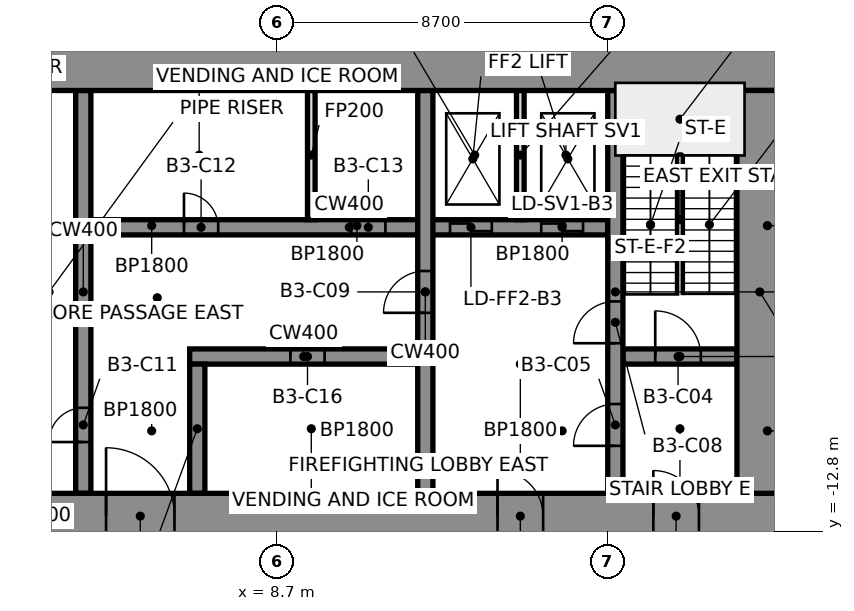
"""IFC4 building model, lengths in metres.
Left out: names, types, materials, properties, quantities, classifications, styles, units other than length and angle.
Written with IfcOpenShell. Run it as: python <this file> out.ifc"""

import sys

from ifc_helpers import new_model, si_unit, direction, frame, frame_2d, origin, place, context, subcontext, project, spatial, rectangle, extrude, element, fill, save


model = new_model("IFC4")
c1 = context("Model", 3, precision=1e-05, world=origin(), true_north=direction((0.0, 1.0)))
c2 = subcontext(c1, "Body", "Model", "MODEL_VIEW")
j1 = project(units=[si_unit("LENGTHUNIT", "METRE"), si_unit("PLANEANGLEUNIT", "RADIAN")], contexts=[c1])
p1 = place(None, origin())
s1 = spatial("IfcSite", under=j1, at=p1, CompositionType="ELEMENT")
p2 = place(p1, origin())
s2 = spatial("IfcBuilding", under=s1, at=p2, CompositionType="ELEMENT")
p3 = place(p2, frame((0.0, 0.0, -15.0)))
s3 = spatial("IfcBuildingStorey", under=s2, at=p3, CompositionType="ELEMENT", Elevation=-15.0)
p4 = place(p3, frame((6.4, -8.2, 0.0), z_axis=(0.0, 0.0, 1.0), x_axis=(1.0, 0.0, 0.0)))
e1 = element("IfcWall", 1, at=p4, inside=s3, PredefinedType="SHEAR", context=c2, shape_type="SweptSolid", body=[
    extrude(rectangle(XDim=6.0, YDim=0.4, at=frame_2d((3.0, 0.0))), origin(), (0.0, 0.0, 1.0), 5.0),
])
p5 = place(p4, frame((2.65, 0.0, 0.0)))
e2 = element("IfcOpeningElement", 2, at=p5, cuts=e1, PredefinedType="OPENING", context=c2, shape_type="SweptSolid", body=[
    extrude(rectangle(XDim=0.9, YDim=2.1, at=frame_2d((0.45, 1.05))), frame((0.0, 0.212, 0.0), z_axis=(0.0, -1.0, 0.0), x_axis=(1.0, 0.0, 0.0)), (0.0, 0.0, 1.0), 0.424),
])
p6 = place(p3, frame((17.8, -8.2, 0.0), z_axis=(0.0, 0.0, 1.0), x_axis=(1.0, 0.0, 0.0)))
e3 = element("IfcWall", 3, at=p6, inside=s3, PredefinedType="SHEAR", context=c2, shape_type="SweptSolid", body=[
    extrude(rectangle(XDim=3.0, YDim=0.4, at=frame_2d((1.5, 0.0))), origin(), (0.0, 0.0, 1.0), 5.0),
])
p7 = place(p6, frame((0.85, 0.0, 0.0)))
e4 = element("IfcOpeningElement", 4, at=p7, cuts=e3, PredefinedType="OPENING", context=c2, shape_type="SweptSolid", body=[
    extrude(rectangle(XDim=1.2, YDim=2.1, at=frame_2d((0.6, 1.05))), frame((0.0, 0.212, 0.0), z_axis=(0.0, -1.0, 0.0), x_axis=(1.0, 0.0, 0.0)), (0.0, 0.0, 1.0), 0.424),
])
p8 = place(p3, frame((3.8, -4.8, 0.0), z_axis=(0.0, 0.0, 1.0), x_axis=(1.0, 0.0, 0.0)))
e5 = element("IfcWall", 5, at=p8, inside=s3, PredefinedType="SHEAR", context=c2, shape_type="SweptSolid", body=[
    extrude(rectangle(XDim=13.6, YDim=0.4, at=frame_2d((6.8, 0.0))), origin(), (0.0, 0.0, 1.0), 5.0),
])
p9 = place(p8, frame((9.45, 0.0, 0.0)))
e6 = element("IfcOpeningElement", 6, at=p9, cuts=e5, PredefinedType="OPENING", context=c2, shape_type="SweptSolid", body=[
    extrude(rectangle(XDim=1.1, YDim=2.1, at=frame_2d((0.55, 1.05))), frame((0.0, 0.212, 0.0), z_axis=(0.0, -1.0, 0.0), x_axis=(1.0, 0.0, 0.0)), (0.0, 0.0, 1.0), 0.424),
])
p10 = place(p8, frame((11.85, 0.0, 0.0)))
e7 = element("IfcOpeningElement", 7, at=p10, cuts=e5, PredefinedType="OPENING", context=c2, shape_type="SweptSolid", body=[
    extrude(rectangle(XDim=1.1, YDim=2.1, at=frame_2d((0.55, 1.05))), frame((0.0, 0.212, 0.0), z_axis=(0.0, -1.0, 0.0), x_axis=(1.0, 0.0, 0.0)), (0.0, 0.0, 1.0), 0.424),
])
p11 = place(p8, frame((2.45, 0.0, 0.0)))
e8 = element("IfcOpeningElement", 8, at=p11, cuts=e5, PredefinedType="OPENING", context=c2, shape_type="SweptSolid", body=[
    extrude(rectangle(XDim=0.9, YDim=2.1, at=frame_2d((0.45, 1.05))), frame((0.0, 0.212, 0.0), z_axis=(0.0, -1.0, 0.0), x_axis=(1.0, 0.0, 0.0)), (0.0, 0.0, 1.0), 0.424),
])
p12 = place(p8, frame((6.85, 0.0, 0.0)))
e9 = element("IfcOpeningElement", 9, at=p12, cuts=e5, PredefinedType="OPENING", context=c2, shape_type="SweptSolid", body=[
    extrude(rectangle(XDim=0.9, YDim=2.1, at=frame_2d((0.45, 1.05))), frame((0.0, 0.212, 0.0), z_axis=(0.0, -1.0, 0.0), x_axis=(1.0, 0.0, 0.0)), (0.0, 0.0, 1.0), 0.424),
])
p13 = place(p3, frame((3.6, -11.8, 0.0), z_axis=(0.0, 0.0, 1.0), x_axis=(0.0, 1.0, 0.0)))
e10 = element("IfcWall", 10, at=p13, inside=s3, PredefinedType="SHEAR", context=c2, shape_type="SweptSolid", body=[
    extrude(rectangle(XDim=10.6, YDim=0.4, at=frame_2d((5.3, 0.0))), origin(), (0.0, 0.0, 1.0), 5.0),
])
p14 = place(p13, frame((1.35, 0.0, 0.0)))
e11 = element("IfcOpeningElement", 11, at=p14, cuts=e10, PredefinedType="OPENING", context=c2, shape_type="SweptSolid", body=[
    extrude(rectangle(XDim=0.9, YDim=2.1, at=frame_2d((0.45, 1.05))), frame((0.0, 0.212, 0.0), z_axis=(0.0, -1.0, 0.0), x_axis=(1.0, 0.0, 0.0)), (0.0, 0.0, 1.0), 0.424),
])
p15 = place(p3, frame((6.6, -11.8, 0.0), z_axis=(0.0, 0.0, 1.0), x_axis=(0.0, 1.0, 0.0)))
e12 = element("IfcWall", 12, at=p15, inside=s3, PredefinedType="SHEAR", context=c2, shape_type="SweptSolid", body=[
    extrude(rectangle(XDim=3.4, YDim=0.4, at=frame_2d((1.7, 0.0))), origin(), (0.0, 0.0, 1.0), 5.0),
])
p16 = place(p3, frame((9.6, -4.6, 0.0), z_axis=(0.0, 0.0, 1.0), x_axis=(0.0, 1.0, 0.0)))
e13 = element("IfcWall", 13, at=p16, inside=s3, PredefinedType="PARTITIONING", context=c2, shape_type="SweptSolid", body=[
    extrude(rectangle(XDim=3.4, YDim=0.2, at=frame_2d((1.7, 0.0))), origin(), (0.0, 0.0, 1.0), 4.7),
])
p17 = place(p3, frame((12.6, -11.8, 0.0), z_axis=(0.0, 0.0, 1.0), x_axis=(0.0, 1.0, 0.0)))
e14 = element("IfcWall", 14, at=p17, inside=s3, PredefinedType="SHEAR", context=c2, shape_type="SweptSolid", body=[
    extrude(rectangle(XDim=10.6, YDim=0.4, at=frame_2d((5.3, 0.0))), origin(), (0.0, 0.0, 1.0), 5.0),
])
p18 = place(p17, frame((4.75, 0.0, 0.0)))
e15 = element("IfcOpeningElement", 15, at=p18, cuts=e14, PredefinedType="OPENING", context=c2, shape_type="SweptSolid", body=[
    extrude(rectangle(XDim=1.1, YDim=2.1, at=frame_2d((0.55, 1.05))), frame((0.0, 0.212, 0.0), z_axis=(0.0, -1.0, 0.0), x_axis=(1.0, 0.0, 0.0)), (0.0, 0.0, 1.0), 0.424),
])
p19 = place(p3, frame((15.1, -4.6, 0.0), z_axis=(0.0, 0.0, 1.0), x_axis=(0.0, 1.0, 0.0)))
e16 = element("IfcWall", 16, at=p19, inside=s3, PredefinedType="PARTITIONING", context=c2, shape_type="SweptSolid", body=[
    extrude(rectangle(XDim=3.4, YDim=0.2, at=frame_2d((1.7, 0.0))), origin(), (0.0, 0.0, 1.0), 4.7),
])
p20 = place(p3, frame((17.6, -11.8, 0.0), z_axis=(0.0, 0.0, 1.0), x_axis=(0.0, 1.0, 0.0)))
e17 = element("IfcWall", 17, at=p20, inside=s3, PredefinedType="SHEAR", context=c2, shape_type="SweptSolid", body=[
    extrude(rectangle(XDim=10.6, YDim=0.4, at=frame_2d((5.3, 0.0))), origin(), (0.0, 0.0, 1.0), 5.0),
])
p21 = place(p20, frame((1.25, 0.0, 0.0)))
e18 = element("IfcOpeningElement", 18, at=p21, cuts=e17, PredefinedType="OPENING", context=c2, shape_type="SweptSolid", body=[
    extrude(rectangle(XDim=1.1, YDim=2.1, at=frame_2d((0.55, 1.05))), frame((0.0, 0.212, 0.0), z_axis=(0.0, -1.0, 0.0), x_axis=(1.0, 0.0, 0.0)), (0.0, 0.0, 1.0), 0.424),
])
p22 = place(p20, frame((3.95, 0.0, 0.0)))
e19 = element("IfcOpeningElement", 19, at=p22, cuts=e17, PredefinedType="OPENING", context=c2, shape_type="SweptSolid", body=[
    extrude(rectangle(XDim=1.1, YDim=2.1, at=frame_2d((0.55, 1.05))), frame((0.0, 0.212, 0.0), z_axis=(0.0, -1.0, 0.0), x_axis=(1.0, 0.0, 0.0)), (0.0, 0.0, 1.0), 0.424),
])
p23 = place(p3, frame((-22.0, -0.6, 0.0), z_axis=(0.0, 0.0, 1.0), x_axis=(1.0, 0.0, 0.0)))
e20 = element("IfcWall", 20, at=p23, inside=s3, PredefinedType="SHEAR", context=c2, shape_type="SweptSolid", body=[
    extrude(rectangle(XDim=44.0, YDim=1.2, at=frame_2d((22.0, 0.0))), origin(), (0.0, 0.0, 1.0), 5.0),
])
p24 = place(p3, frame((-22.0, -12.4, 0.0), z_axis=(0.0, 0.0, 1.0), x_axis=(1.0, 0.0, 0.0)))
e21 = element("IfcWall", 21, at=p24, inside=s3, PredefinedType="SHEAR", context=c2, shape_type="SweptSolid", body=[
    extrude(rectangle(XDim=44.0, YDim=1.2, at=frame_2d((22.0, 0.0))), origin(), (0.0, 0.0, 1.0), 5.0),
])
p25 = place(p24, frame((2.2, 0.0, 0.0)))
e22 = element("IfcOpeningElement", 22, at=p25, cuts=e21, PredefinedType="OPENING", context=c2, shape_type="SweptSolid", body=[
    extrude(rectangle(XDim=1.2, YDim=2.1, at=frame_2d((0.6, 1.05))), frame((0.0, 0.612, 0.0), z_axis=(0.0, -1.0, 0.0), x_axis=(1.0, 0.0, 0.0)), (0.0, 0.0, 1.0), 1.224),
])
p26 = place(p24, frame((21.4, 0.0, 0.0)))
e23 = element("IfcOpeningElement", 23, at=p26, cuts=e21, PredefinedType="OPENING", context=c2, shape_type="SweptSolid", body=[
    extrude(rectangle(XDim=1.2, YDim=2.1, at=frame_2d((0.6, 1.05))), frame((0.0, 0.612, 0.0), z_axis=(0.0, -1.0, 0.0), x_axis=(1.0, 0.0, 0.0)), (0.0, 0.0, 1.0), 1.224),
])
p27 = place(p24, frame((40.6, 0.0, 0.0)))
e24 = element("IfcOpeningElement", 24, at=p27, cuts=e21, PredefinedType="OPENING", context=c2, shape_type="SweptSolid", body=[
    extrude(rectangle(XDim=1.2, YDim=2.1, at=frame_2d((0.6, 1.05))), frame((0.0, 0.612, 0.0), z_axis=(0.0, -1.0, 0.0), x_axis=(1.0, 0.0, 0.0)), (0.0, 0.0, 1.0), 1.224),
])
p28 = place(p24, frame((16.0, 0.0, 0.0)))
e25 = element("IfcOpeningElement", 25, at=p28, cuts=e21, PredefinedType="OPENING", context=c2, shape_type="SweptSolid", body=[
    extrude(rectangle(XDim=1.8, YDim=2.1, at=frame_2d((0.9, 1.05))), frame((0.0, 0.612, 0.0), z_axis=(0.0, -1.0, 0.0), x_axis=(1.0, 0.0, 0.0)), (0.0, 0.0, 1.0), 1.224),
])
p29 = place(p24, frame((6.3, 0.0, 0.0)))
e26 = element("IfcOpeningElement", 26, at=p29, cuts=e21, PredefinedType="OPENING", context=c2, shape_type="SweptSolid", body=[
    extrude(rectangle(XDim=1.2, YDim=2.1, at=frame_2d((0.6, 1.05))), frame((0.0, 0.612, 0.0), z_axis=(0.0, -1.0, 0.0), x_axis=(1.0, 0.0, 0.0)), (0.0, 0.0, 1.0), 1.224),
])
p30 = place(p24, frame((26.2, 0.0, 0.0)))
e27 = element("IfcOpeningElement", 27, at=p30, cuts=e21, PredefinedType="OPENING", context=c2, shape_type="SweptSolid", body=[
    extrude(rectangle(XDim=1.8, YDim=2.1, at=frame_2d((0.9, 1.05))), frame((0.0, 0.612, 0.0), z_axis=(0.0, -1.0, 0.0), x_axis=(1.0, 0.0, 0.0)), (0.0, 0.0, 1.0), 1.224),
])
p31 = place(p24, frame((36.5, 0.0, 0.0)))
e28 = element("IfcOpeningElement", 28, at=p31, cuts=e21, PredefinedType="OPENING", context=c2, shape_type="SweptSolid", body=[
    extrude(rectangle(XDim=1.2, YDim=2.1, at=frame_2d((0.6, 1.05))), frame((0.0, 0.612, 0.0), z_axis=(0.0, -1.0, 0.0), x_axis=(1.0, 0.0, 0.0)), (0.0, 0.0, 1.0), 1.224),
])
p32 = place(p3, frame((21.4, -11.8, 0.0), z_axis=(0.0, 0.0, 1.0), x_axis=(0.0, 1.0, 0.0)))
e29 = element("IfcWall", 29, at=p32, inside=s3, PredefinedType="SHEAR", context=c2, shape_type="SweptSolid", body=[
    extrude(rectangle(XDim=10.6, YDim=1.2, at=frame_2d((5.3, 0.0))), origin(), (0.0, 0.0, 1.0), 5.0),
])
p33 = place(p7, origin())
e30 = element("IfcDoor", 30, at=p33, inside=s3, OperationType="SINGLE_SWING_RIGHT", PredefinedType="DOOR", context=c2, shape_type="SweptSolid", body=[
    extrude(rectangle(XDim=1.2, YDim=2.1, at=frame_2d((0.6, 1.05))), frame((0.0, 0.025, 0.0), z_axis=(0.0, -1.0, 0.0), x_axis=(1.0, 0.0, 0.0)), (0.0, 0.0, 1.0), 0.05),
])
fill(e4, e30)
p34 = place(p21, origin())
e31 = element("IfcDoor", 31, at=p34, inside=s3, OperationType="SINGLE_SWING_LEFT", PredefinedType="DOOR", context=c2, shape_type="SweptSolid", body=[
    extrude(rectangle(XDim=1.1, YDim=2.1, at=frame_2d((0.55, 1.05))), frame((0.0, 0.025, 0.0), z_axis=(0.0, -1.0, 0.0), x_axis=(1.0, 0.0, 0.0)), (0.0, 0.0, 1.0), 0.05),
])
fill(e18, e31)
p35 = place(p9, origin())
e32 = element("IfcDoor", 32, at=p35, inside=s3, OperationType="DOUBLE_DOOR_SLIDING", PredefinedType="DOOR", context=c2, shape_type="SweptSolid", body=[
    extrude(rectangle(XDim=1.1, YDim=2.1, at=frame_2d((0.55, 1.05))), frame((0.0, 0.025, 0.0), z_axis=(0.0, -1.0, 0.0), x_axis=(1.0, 0.0, 0.0)), (0.0, 0.0, 1.0), 0.05),
])
fill(e6, e32)
p36 = place(p10, origin())
e33 = element("IfcDoor", 33, at=p36, inside=s3, OperationType="DOUBLE_DOOR_SLIDING", PredefinedType="DOOR", context=c2, shape_type="SweptSolid", body=[
    extrude(rectangle(XDim=1.1, YDim=2.1, at=frame_2d((0.55, 1.05))), frame((0.0, 0.025, 0.0), z_axis=(0.0, -1.0, 0.0), x_axis=(1.0, 0.0, 0.0)), (0.0, 0.0, 1.0), 0.05),
])
fill(e7, e33)
p37 = place(p22, origin())
e34 = element("IfcDoor", 34, at=p37, inside=s3, OperationType="SINGLE_SWING_RIGHT", PredefinedType="DOOR", context=c2, shape_type="SweptSolid", body=[
    extrude(rectangle(XDim=1.1, YDim=2.1, at=frame_2d((0.55, 1.05))), frame((0.0, 0.025, 0.0), z_axis=(0.0, -1.0, 0.0), x_axis=(1.0, 0.0, 0.0)), (0.0, 0.0, 1.0), 0.05),
])
fill(e19, e34)
p38 = place(p18, frame((1.1, 0.0, 0.0), z_axis=(0.0, 0.0, 1.0), x_axis=(-1.0, 0.0, 0.0)))
e35 = element("IfcDoor", 35, at=p38, inside=s3, OperationType="SINGLE_SWING_RIGHT", PredefinedType="DOOR", context=c2, shape_type="SweptSolid", body=[
    extrude(rectangle(XDim=1.1, YDim=2.1, at=frame_2d((0.55, 1.05))), frame((0.0, 0.025, 0.0), z_axis=(0.0, -1.0, 0.0), x_axis=(1.0, 0.0, 0.0)), (0.0, 0.0, 1.0), 0.05),
])
fill(e15, e35)
p39 = place(p14, origin())
e36 = element("IfcDoor", 36, at=p39, inside=s3, OperationType="SINGLE_SWING_LEFT", PredefinedType="DOOR", context=c2, shape_type="SweptSolid", body=[
    extrude(rectangle(XDim=0.9, YDim=2.1, at=frame_2d((0.45, 1.05))), frame((0.0, 0.025, 0.0), z_axis=(0.0, -1.0, 0.0), x_axis=(1.0, 0.0, 0.0)), (0.0, 0.0, 1.0), 0.05),
])
fill(e11, e36)
p40 = place(p11, origin())
e37 = element("IfcDoor", 37, at=p40, inside=s3, OperationType="SINGLE_SWING_RIGHT", PredefinedType="DOOR", context=c2, shape_type="SweptSolid", body=[
    extrude(rectangle(XDim=0.9, YDim=2.1, at=frame_2d((0.45, 1.05))), frame((0.0, 0.025, 0.0), z_axis=(0.0, -1.0, 0.0), x_axis=(1.0, 0.0, 0.0)), (0.0, 0.0, 1.0), 0.05),
])
fill(e8, e37)
p41 = place(p12, origin())
e38 = element("IfcDoor", 38, at=p41, inside=s3, OperationType="SINGLE_SWING_LEFT", PredefinedType="DOOR", context=c2, shape_type="SweptSolid", body=[
    extrude(rectangle(XDim=0.9, YDim=2.1, at=frame_2d((0.45, 1.05))), frame((0.0, 0.025, 0.0), z_axis=(0.0, -1.0, 0.0), x_axis=(1.0, 0.0, 0.0)), (0.0, 0.0, 1.0), 0.05),
])
fill(e9, e38)
p42 = place(p5, frame((0.9, 0.0, 0.0), z_axis=(0.0, 0.0, 1.0), x_axis=(-1.0, 0.0, 0.0)))
e39 = element("IfcDoor", 39, at=p42, inside=s3, OperationType="SINGLE_SWING_LEFT", PredefinedType="DOOR", context=c2, shape_type="SweptSolid", body=[
    extrude(rectangle(XDim=0.9, YDim=2.1, at=frame_2d((0.45, 1.05))), frame((0.0, 0.025, 0.0), z_axis=(0.0, -1.0, 0.0), x_axis=(1.0, 0.0, 0.0)), (0.0, 0.0, 1.0), 0.05),
])
fill(e2, e39)
p43 = place(p27, frame((1.2, 0.0, 0.0), z_axis=(0.0, 0.0, 1.0), x_axis=(-1.0, 0.0, 0.0)))
e40 = element("IfcDoor", 40, at=p43, inside=s3, OperationType="SINGLE_SWING_RIGHT", PredefinedType="DOOR", context=c2, shape_type="SweptSolid", body=[
    extrude(rectangle(XDim=1.2, YDim=2.1, at=frame_2d((0.6, 1.05))), frame((0.0, 0.025, 0.0), z_axis=(0.0, -1.0, 0.0), x_axis=(1.0, 0.0, 0.0)), (0.0, 0.0, 1.0), 0.05),
])
fill(e24, e40)
p44 = place(p30, origin())
e41 = element("IfcDoor", 41, at=p44, inside=s3, OperationType="SINGLE_SWING_LEFT", PredefinedType="DOOR", context=c2, shape_type="SweptSolid", body=[
    extrude(rectangle(XDim=1.8, YDim=2.1, at=frame_2d((0.9, 1.05))), frame((0.0, 0.025, 0.0), z_axis=(0.0, -1.0, 0.0), x_axis=(1.0, 0.0, 0.0)), (0.0, 0.0, 1.0), 0.05),
])
fill(e27, e41)
p45 = place(p31, frame((1.2, 0.0, 0.0), z_axis=(0.0, 0.0, 1.0), x_axis=(-1.0, 0.0, 0.0)))
e42 = element("IfcDoor", 42, at=p45, inside=s3, OperationType="SINGLE_SWING_RIGHT", PredefinedType="DOOR", context=c2, shape_type="SweptSolid", body=[
    extrude(rectangle(XDim=1.2, YDim=2.1, at=frame_2d((0.6, 1.05))), frame((0.0, 0.025, 0.0), z_axis=(0.0, -1.0, 0.0), x_axis=(1.0, 0.0, 0.0)), (0.0, 0.0, 1.0), 0.05),
])
fill(e28, e42)
save(model, sys.argv[1])
